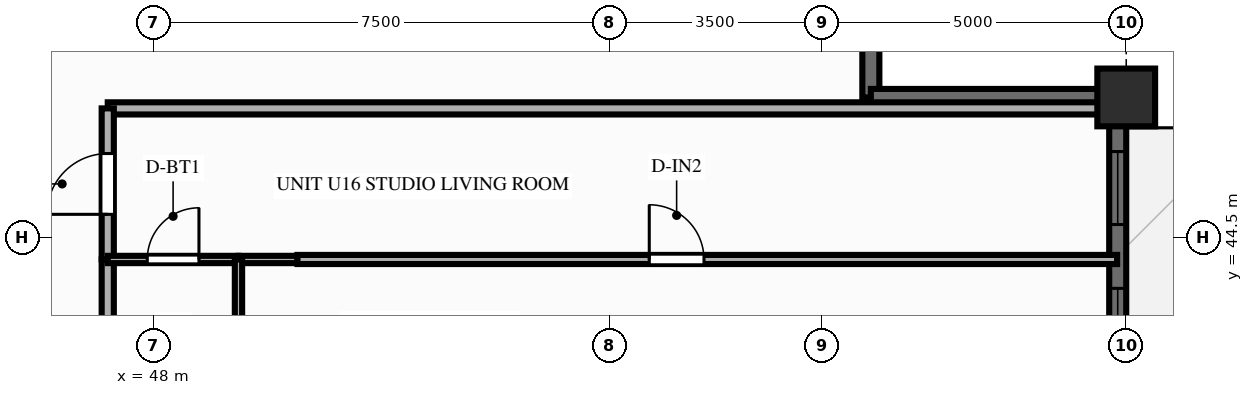
"""IFC4 building model, lengths in metres.
Left out: names, types, materials, properties, quantities, classifications, styles, units other than length and angle.
Written with IfcOpenShell. Run it as: python <this file> out.ifc"""

import sys

from ifc_helpers import new_model, si_unit, direction, frame, frame_2d, origin, origin_2d, place, context, subcontext, project, spatial, rectangle, extrude, source, transform, mapped, element, fill, save


model = new_model("IFC4")
c1 = context("Model", 3, precision=1e-05, world=origin(), true_north=direction((0.0, 1.0)))
c2 = subcontext(c1, "Body", "Model", "MODEL_VIEW")
j1 = project(units=[si_unit("LENGTHUNIT", "METRE"), si_unit("PLANEANGLEUNIT", "RADIAN")], contexts=[c1])
p1 = place(None, origin())
s1 = spatial("IfcSite", under=j1, at=p1, CompositionType="ELEMENT")
p2 = place(p1, origin())
s2 = spatial("IfcBuilding", under=s1, at=p2, CompositionType="ELEMENT")
p3 = place(p2, frame((0.0, 0.0, 122.85)))
s3 = spatial("IfcBuildingStorey", under=s2, at=p3, CompositionType="ELEMENT", Elevation=122.85)
m1 = source(origin(), c2, "Body", "SweptSolid", [
    extrude(rectangle(XDim=0.95, YDim=0.95, at=origin_2d()), origin(), (0.0, 0.0, 1.0), 3.9),
])
p4 = place(p3, frame((64.0, 46.8, 0.0), z_axis=(0.0, 0.0, 1.0), x_axis=(1.0, 0.0, 0.0)))
e1 = element("IfcColumn", 1, at=p4, inside=s3, PredefinedType="COLUMN", context=c2, shape_type="MappedRepresentation", body=[
    mapped(m1, transform((0.0, 0.0, 0.0), scale=1.0)),
])
p5 = place(p3, frame((63.86, 7.2, 0.0), z_axis=(0.0, 0.0, 1.0), x_axis=(0.0, 1.0, 0.0)))
e2 = element("IfcWall", 2, at=p5, inside=s3, PredefinedType="SOLIDWALL", context=c2, shape_type="SweptSolid", body=[
    extrude(rectangle(XDim=39.6, YDim=0.28, at=frame_2d((19.8, 0.0))), origin(), (0.0, 0.0, 1.0), 2.24),
])
p6 = place(p5, frame((0.89, 0.0, 0.25)))
e3 = element("IfcOpeningElement", 3, at=p6, cuts=e2, PredefinedType="OPENING", context=c2, shape_type="SweptSolid", body=[
    extrude(rectangle(XDim=1.2, YDim=1.5, at=frame_2d((0.6, 0.75))), frame((0.0, 0.152, 0.0), z_axis=(0.0, -1.0, 0.0), x_axis=(1.0, 0.0, 0.0)), (0.0, 0.0, 1.0), 0.304),
])
p7 = place(p5, frame((3.14, 0.0, 0.25)))
e4 = element("IfcOpeningElement", 4, at=p7, cuts=e2, PredefinedType="OPENING", context=c2, shape_type="SweptSolid", body=[
    extrude(rectangle(XDim=1.2, YDim=1.5, at=frame_2d((0.6, 0.75))), frame((0.0, 0.152, 0.0), z_axis=(0.0, -1.0, 0.0), x_axis=(1.0, 0.0, 0.0)), (0.0, 0.0, 1.0), 0.304),
])
p8 = place(p5, frame((5.458, 0.0, 0.25)))
e5 = element("IfcOpeningElement", 5, at=p8, cuts=e2, PredefinedType="OPENING", context=c2, shape_type="SweptSolid", body=[
    extrude(rectangle(XDim=1.2, YDim=1.5, at=frame_2d((0.6, 0.75))), frame((0.0, 0.152, 0.0), z_axis=(0.0, -1.0, 0.0), x_axis=(1.0, 0.0, 0.0)), (0.0, 0.0, 1.0), 0.304),
])
p9 = place(p5, frame((7.775, 0.0, 0.25)))
e6 = element("IfcOpeningElement", 6, at=p9, cuts=e2, PredefinedType="OPENING", context=c2, shape_type="SweptSolid", body=[
    extrude(rectangle(XDim=1.2, YDim=1.5, at=frame_2d((0.6, 0.75))), frame((0.0, 0.152, 0.0), z_axis=(0.0, -1.0, 0.0), x_axis=(1.0, 0.0, 0.0)), (0.0, 0.0, 1.0), 0.304),
])
p10 = place(p5, frame((12.242, 0.0, 0.25)))
e7 = element("IfcOpeningElement", 7, at=p10, cuts=e2, PredefinedType="OPENING", context=c2, shape_type="SweptSolid", body=[
    extrude(rectangle(XDim=1.2, YDim=1.5, at=frame_2d((0.6, 0.75))), frame((0.0, 0.152, 0.0), z_axis=(0.0, -1.0, 0.0), x_axis=(1.0, 0.0, 0.0)), (0.0, 0.0, 1.0), 0.304),
])
p11 = place(p5, frame((14.56, 0.0, 0.25)))
e8 = element("IfcOpeningElement", 8, at=p11, cuts=e2, PredefinedType="OPENING", context=c2, shape_type="SweptSolid", body=[
    extrude(rectangle(XDim=1.2, YDim=1.5, at=frame_2d((0.6, 0.75))), frame((0.0, 0.152, 0.0), z_axis=(0.0, -1.0, 0.0), x_axis=(1.0, 0.0, 0.0)), (0.0, 0.0, 1.0), 0.304),
])
p12 = place(p5, frame((16.877, 0.0, 0.25)))
e9 = element("IfcOpeningElement", 9, at=p12, cuts=e2, PredefinedType="OPENING", context=c2, shape_type="SweptSolid", body=[
    extrude(rectangle(XDim=1.2, YDim=1.5, at=frame_2d((0.6, 0.75))), frame((0.0, 0.152, 0.0), z_axis=(0.0, -1.0, 0.0), x_axis=(1.0, 0.0, 0.0)), (0.0, 0.0, 1.0), 0.304),
])
p13 = place(p5, frame((20.35, 0.0, 0.0), z_axis=(0.0, 0.0, 1.0), x_axis=(-1.0, 0.0, 0.0)))
e10 = element("IfcOpeningElement", 10, at=p13, cuts=e2, PredefinedType="OPENING", context=c2, shape_type="SweptSolid", body=[
    extrude(rectangle(XDim=1.1, YDim=2.15, at=frame_2d((0.55, 1.075))), frame((0.0, 0.152, 0.0), z_axis=(0.0, -1.0, 0.0), x_axis=(1.0, 0.0, 0.0)), (0.0, 0.0, 1.0), 0.304),
])
p14 = place(p5, frame((21.522, 0.0, 0.25)))
e11 = element("IfcOpeningElement", 11, at=p14, cuts=e2, PredefinedType="OPENING", context=c2, shape_type="SweptSolid", body=[
    extrude(rectangle(XDim=1.2, YDim=1.5, at=frame_2d((0.6, 0.75))), frame((0.0, 0.152, 0.0), z_axis=(0.0, -1.0, 0.0), x_axis=(1.0, 0.0, 0.0)), (0.0, 0.0, 1.0), 0.304),
])
p15 = place(p5, frame((23.84, 0.0, 0.25)))
e12 = element("IfcOpeningElement", 12, at=p15, cuts=e2, PredefinedType="OPENING", context=c2, shape_type="SweptSolid", body=[
    extrude(rectangle(XDim=1.2, YDim=1.5, at=frame_2d((0.6, 0.75))), frame((0.0, 0.152, 0.0), z_axis=(0.0, -1.0, 0.0), x_axis=(1.0, 0.0, 0.0)), (0.0, 0.0, 1.0), 0.304),
])
p16 = place(p5, frame((26.157, 0.0, 0.25)))
e13 = element("IfcOpeningElement", 13, at=p16, cuts=e2, PredefinedType="OPENING", context=c2, shape_type="SweptSolid", body=[
    extrude(rectangle(XDim=1.2, YDim=1.5, at=frame_2d((0.6, 0.75))), frame((0.0, 0.152, 0.0), z_axis=(0.0, -1.0, 0.0), x_axis=(1.0, 0.0, 0.0)), (0.0, 0.0, 1.0), 0.304),
])
p17 = place(p5, frame((30.625, 0.0, 0.25)))
e14 = element("IfcOpeningElement", 14, at=p17, cuts=e2, PredefinedType="OPENING", context=c2, shape_type="SweptSolid", body=[
    extrude(rectangle(XDim=1.2, YDim=1.5, at=frame_2d((0.6, 0.75))), frame((0.0, 0.152, 0.0), z_axis=(0.0, -1.0, 0.0), x_axis=(1.0, 0.0, 0.0)), (0.0, 0.0, 1.0), 0.304),
])
p18 = place(p5, frame((32.942, 0.0, 0.25)))
e15 = element("IfcOpeningElement", 15, at=p18, cuts=e2, PredefinedType="OPENING", context=c2, shape_type="SweptSolid", body=[
    extrude(rectangle(XDim=1.2, YDim=1.5, at=frame_2d((0.6, 0.75))), frame((0.0, 0.152, 0.0), z_axis=(0.0, -1.0, 0.0), x_axis=(1.0, 0.0, 0.0)), (0.0, 0.0, 1.0), 0.304),
])
p19 = place(p5, frame((35.26, 0.0, 0.25)))
e16 = element("IfcOpeningElement", 16, at=p19, cuts=e2, PredefinedType="OPENING", context=c2, shape_type="SweptSolid", body=[
    extrude(rectangle(XDim=1.2, YDim=1.5, at=frame_2d((0.6, 0.75))), frame((0.0, 0.152, 0.0), z_axis=(0.0, -1.0, 0.0), x_axis=(1.0, 0.0, 0.0)), (0.0, 0.0, 1.0), 0.304),
])
p20 = place(p5, frame((37.51, 0.0, 0.25)))
e17 = element("IfcOpeningElement", 17, at=p20, cuts=e2, PredefinedType="OPENING", context=c2, shape_type="SweptSolid", body=[
    extrude(rectangle(XDim=1.2, YDim=1.5, at=frame_2d((0.6, 0.75))), frame((0.0, 0.152, 0.0), z_axis=(0.0, -1.0, 0.0), x_axis=(1.0, 0.0, 0.0)), (0.0, 0.0, 1.0), 0.304),
])
for number, where, z_axis, x_axis in (
    (18, (59.8, 46.8, 0.0), (0.0, 0.0, 1.0), (0.0, 1.0, 0.0)),
    (19, (59.8, 46.8, 0.0), (0.0, 0.0, 1.0), (1.0, 0.0, 0.0)),
):
    element("IfcWall", number, at=place(p3, frame(where, z_axis=z_axis, x_axis=x_axis)), inside=s3, PredefinedType="SOLIDWALL", context=c2, shape_type="SweptSolid", body=[
        extrude(rectangle(XDim=4.12, YDim=0.28, at=frame_2d((2.06, 0.0))), origin(), (0.0, 0.0, 1.0), 2.24),
    ])
p21 = place(p3, frame((47.25, 46.62, 0.0), z_axis=(0.0, 0.0, 1.0), x_axis=(1.0, 0.0, 0.0)))
e20 = element("IfcWall", 20, at=p21, inside=s3, PredefinedType="PARTITIONING", context=c2, shape_type="SweptSolid", body=[
    extrude(rectangle(XDim=16.6, YDim=0.2, at=frame_2d((8.3, 0.0))), origin(), (0.0, 0.0, 1.0), 3.56),
])
p22 = place(p3, frame((47.25, 41.985, 0.0), z_axis=(0.0, 0.0, 1.0), x_axis=(0.0, 1.0, 0.0)))
e21 = element("IfcWall", 21, at=p22, inside=s3, PredefinedType="PARTITIONING", context=c2, shape_type="SweptSolid", body=[
    extrude(rectangle(XDim=2.15, YDim=0.2, at=frame_2d((1.075, 0.0))), origin(), (0.0, 0.0, 1.0), 3.56),
])
p23 = place(p3, frame((47.25, 44.135, 0.0), z_axis=(0.0, 0.0, 1.0), x_axis=(0.0, 1.0, 0.0)))
e22 = element("IfcWall", 22, at=p23, inside=s3, PredefinedType="PARTITIONING", context=c2, shape_type="SweptSolid", body=[
    extrude(rectangle(XDim=2.485, YDim=0.2, at=frame_2d((1.243, 0.0))), origin(), (0.0, 0.0, 1.0), 3.56),
])
p24 = place(p23, frame((0.742, 0.0, 0.0)))
e23 = element("IfcOpeningElement", 23, at=p24, cuts=e22, PredefinedType="OPENING", context=c2, shape_type="SweptSolid", body=[
    extrude(rectangle(XDim=1.0, YDim=2.15, at=frame_2d((0.5, 1.075))), frame((0.0, 0.112, 0.0), z_axis=(0.0, -1.0, 0.0), x_axis=(1.0, 0.0, 0.0)), (0.0, 0.0, 1.0), 0.224),
])
p25 = place(p3, frame((47.25, 44.135, 0.0), z_axis=(0.0, 0.0, 1.0), x_axis=(1.0, 0.0, 0.0)))
e24 = element("IfcWall", 24, at=p25, inside=s3, PredefinedType="PARTITIONING", context=c2, shape_type="SweptSolid", body=[
    extrude(rectangle(XDim=2.15, YDim=0.12, at=frame_2d((1.075, 0.0))), origin(), (0.0, 0.0, 1.0), 3.56),
])
p26 = place(p25, frame((0.65, 0.0, 0.0)))
e25 = element("IfcOpeningElement", 25, at=p26, cuts=e24, PredefinedType="OPENING", context=c2, shape_type="SweptSolid", body=[
    extrude(rectangle(XDim=0.85, YDim=2.05, at=frame_2d((0.425, 1.025))), frame((0.0, 0.072, 0.0), z_axis=(0.0, -1.0, 0.0), x_axis=(1.0, 0.0, 0.0)), (0.0, 0.0, 1.0), 0.144),
])
p27 = place(p3, frame((49.4, 44.135, 0.0), z_axis=(0.0, 0.0, 1.0), x_axis=(1.0, 0.0, 0.0)))
e26 = element("IfcWall", 26, at=p27, inside=s3, PredefinedType="PARTITIONING", context=c2, shape_type="SweptSolid", body=[
    extrude(rectangle(XDim=0.97, YDim=0.12, at=frame_2d((0.485, 0.0))), origin(), (0.0, 0.0, 1.0), 3.56),
])
p28 = place(p3, frame((49.4, 41.985, 0.0), z_axis=(0.0, 0.0, 1.0), x_axis=(0.0, 1.0, 0.0)))
e27 = element("IfcWall", 27, at=p28, inside=s3, PredefinedType="PARTITIONING", context=c2, shape_type="SweptSolid", body=[
    extrude(rectangle(XDim=2.15, YDim=0.12, at=frame_2d((1.075, 0.0))), origin(), (0.0, 0.0, 1.0), 3.56),
])
p29 = place(p3, frame((50.37, 44.135, 0.0), z_axis=(0.0, 0.0, 1.0), x_axis=(1.0, 0.0, 0.0)))
e28 = element("IfcWall", 28, at=p29, inside=s3, PredefinedType="PARTITIONING", context=c2, shape_type="SweptSolid", body=[
    extrude(rectangle(XDim=13.48, YDim=0.15, at=frame_2d((6.74, 0.0))), origin(), (0.0, 0.0, 1.0), 3.56),
])
p30 = place(p29, frame((5.786, 0.0, 0.0)))
e29 = element("IfcOpeningElement", 29, at=p30, cuts=e28, PredefinedType="OPENING", context=c2, shape_type="SweptSolid", body=[
    extrude(rectangle(XDim=0.9, YDim=2.1, at=frame_2d((0.45, 1.05))), frame((0.0, 0.087, 0.0), z_axis=(0.0, -1.0, 0.0), x_axis=(1.0, 0.0, 0.0)), (0.0, 0.0, 1.0), 0.174),
])
m2 = source(origin(), c2, "Body", "SweptSolid", [
    extrude(rectangle(XDim=1.2, YDim=1.5, at=frame_2d((0.6, 0.75))), frame((0.0, 0.03, 0.0), z_axis=(0.0, -1.0, 0.0), x_axis=(1.0, 0.0, 0.0)), (0.0, 0.0, 1.0), 0.06),
])
p31 = place(p19, origin())
e30 = element("IfcWindow", 30, at=p31, inside=s3, PartitioningType="SINGLE_PANEL", PredefinedType="WINDOW", context=c2, shape_type="MappedRepresentation", body=[
    mapped(m2, transform((0.0, 0.0, 0.0), scale=1.0)),
])
fill(e16, e30)
p32 = place(p20, origin())
e31 = element("IfcWindow", 31, at=p32, inside=s3, PartitioningType="SINGLE_PANEL", PredefinedType="WINDOW", context=c2, shape_type="MappedRepresentation", body=[
    mapped(m2, transform((0.0, 0.0, 0.0), scale=1.0)),
])
fill(e17, e31)
m3 = source(origin(), c2, "Body", "SweptSolid", [
    extrude(rectangle(XDim=1.0, YDim=2.15, at=frame_2d((0.5, 1.075))), frame((0.0, 0.025, 0.0), z_axis=(0.0, -1.0, 0.0), x_axis=(1.0, 0.0, 0.0)), (0.0, 0.0, 1.0), 0.05),
])
p33 = place(p24, origin())
e32 = element("IfcDoor", 32, at=p33, inside=s3, OperationType="SINGLE_SWING_LEFT", PredefinedType="DOOR", context=c2, shape_type="MappedRepresentation", body=[
    mapped(m3, transform((0.0, 0.0, 0.0), scale=1.0)),
])
fill(e23, e32)
m4 = source(origin(), c2, "Body", "SweptSolid", [
    extrude(rectangle(XDim=0.85, YDim=2.05, at=frame_2d((0.425, 1.025))), frame((0.0, 0.025, 0.0), z_axis=(0.0, -1.0, 0.0), x_axis=(1.0, 0.0, 0.0)), (0.0, 0.0, 1.0), 0.05),
])
p34 = place(p26, origin())
e33 = element("IfcDoor", 33, at=p34, inside=s3, OperationType="SINGLE_SWING_RIGHT", PredefinedType="DOOR", context=c2, shape_type="MappedRepresentation", body=[
    mapped(m4, transform((0.0, 0.0, 0.0), scale=1.0)),
])
fill(e25, e33)
m5 = source(origin(), c2, "Body", "SweptSolid", [
    extrude(rectangle(XDim=0.9, YDim=2.1, at=frame_2d((0.45, 1.05))), frame((0.0, 0.025, 0.0), z_axis=(0.0, -1.0, 0.0), x_axis=(1.0, 0.0, 0.0)), (0.0, 0.0, 1.0), 0.05),
])
p35 = place(p30, origin())
e34 = element("IfcDoor", 34, at=p35, inside=s3, OperationType="SINGLE_SWING_LEFT", PredefinedType="DOOR", context=c2, shape_type="MappedRepresentation", body=[
    mapped(m5, transform((0.0, 0.0, 0.0), scale=1.0)),
])
fill(e29, e34)
save(model, sys.argv[1])
